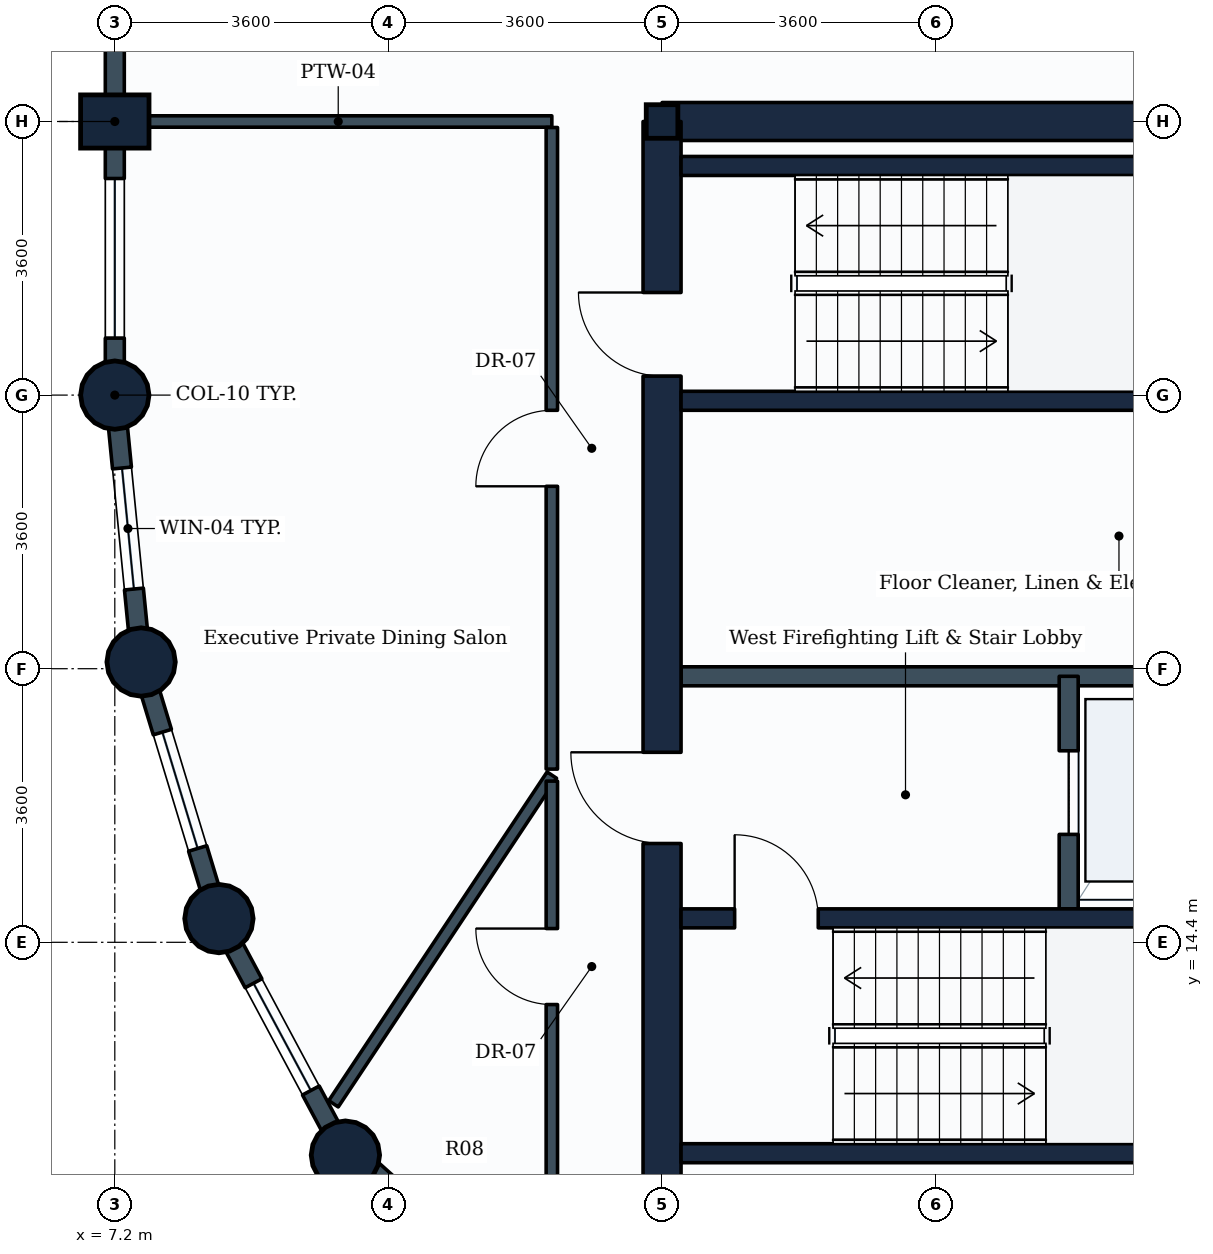
"""IFC4 building model, lengths in metres.
Left out: names, types, materials, properties, quantities, classifications, styles, units other than length and angle.
Written with IfcOpenShell. Run it as: python <this file> out.ifc"""

import sys

from ifc_helpers import new_model, si_unit, direction, frame, frame_2d, origin, origin_2d, place, context, subcontext, project, spatial, rectangle, circle, i_section, extrude, element, fill, save


model = new_model("IFC4")
c1 = context("Model", 3, precision=1e-05, world=origin(), true_north=direction((0.0, 1.0)))
c2 = subcontext(c1, "Body", "Model", "MODEL_VIEW")
j1 = project(units=[si_unit("LENGTHUNIT", "METRE"), si_unit("PLANEANGLEUNIT", "RADIAN")], contexts=[c1])
p1 = place(None, origin())
s1 = spatial("IfcSite", under=j1, at=p1, CompositionType="ELEMENT")
p2 = place(p1, origin())
s2 = spatial("IfcBuilding", under=s1, at=p2, CompositionType="ELEMENT")
p3 = place(p2, frame((0.0, 0.0, 201.4)))
s3 = spatial("IfcBuildingStorey", under=s2, at=p3, CompositionType="ELEMENT", Elevation=201.4)
p4 = place(p3, frame((7.2, 21.6, 0.0), z_axis=(0.0, 0.0, 1.0), x_axis=(1.0, 0.0, 0.0)))
e1 = element("IfcColumn", 1, at=p4, inside=s3, PredefinedType="COLUMN", context=c2, shape_type="SweptSolid", body=[
    extrude(circle(Radius=0.45, at=origin_2d()), origin(), (0.0, 0.0, 1.0), 3.8),
])
p5 = place(p3, frame((7.2, 25.2, 0.0), z_axis=(0.0, 0.0, 1.0), x_axis=(0.0, 1.0, 0.0)))
e2 = element("IfcColumn", 2, at=p5, inside=s3, PredefinedType="COLUMN", context=c2, shape_type="SweptSolid", body=[
    extrude(rectangle(XDim=0.7, YDim=0.9, at=origin_2d()), origin(), (0.0, 0.0, 1.0), 3.8),
])
for number, where, z_axis, x_axis in (
    (3, (7.546, 18.088, 0.0), (0.0, 0.0, 1.0), (1.0, 0.0, 0.0)),
    (4, (8.57, 14.712, 0.0), (0.0, 0.0, 1.0), (1.0, 0.0, 0.0)),
    (5, (10.234, 11.6, 0.0), (0.0, 0.0, 1.0), (1.0, 0.0, 0.0)),
):
    element("IfcColumn", number, at=place(p3, frame(where, z_axis=z_axis, x_axis=x_axis)), inside=s3, PredefinedType="COLUMN", context=c2, shape_type="SweptSolid", body=[
        extrude(circle(Radius=0.45, at=origin_2d()), origin(), (0.0, 0.0, 1.0), 3.8),
    ])
p6 = place(p3, frame((14.4, 25.2, 0.0), z_axis=(0.0, 0.0, 1.0), x_axis=(1.0, 0.0, 0.0)))
e6 = element("IfcColumn", 6, at=p6, inside=s3, PredefinedType="COLUMN", context=c2, shape_type="SweptSolid", body=[
    extrude(i_section(OverallWidth=0.416, OverallDepth=0.442, WebThickness=0.025, FlangeThickness=0.041, FilletRadius=0.015, at=origin_2d()), origin(), (0.0, 0.0, 1.0), 3.8),
])
p7 = place(p3, frame((7.2, 25.2, 0.0), z_axis=(0.0, 0.0, 1.0), x_axis=(0.0, 1.0, 0.0)))
e7 = element("IfcWall", 7, at=p7, inside=s3, PredefinedType="STANDARD", context=c2, shape_type="SweptSolid", body=[
    extrude(rectangle(XDim=3.6, YDim=0.25, at=frame_2d((1.8, 0.0))), origin(), (0.0, 0.0, 1.0), 2.93),
])
p8 = place(p3, frame((7.2, 21.6, 0.0), z_axis=(0.0, 0.0, 1.0), x_axis=(0.0, 1.0, 0.0)))
e8 = element("IfcWall", 8, at=p8, inside=s3, PredefinedType="STANDARD", context=c2, shape_type="SweptSolid", body=[
    extrude(rectangle(XDim=3.6, YDim=0.25, at=frame_2d((1.8, 0.0))), origin(), (0.0, 0.0, 1.0), 2.93),
])
p9 = place(p8, frame((0.75, 0.0, 0.85)))
e9 = element("IfcOpeningElement", 9, at=p9, cuts=e8, PredefinedType="OPENING", context=c2, shape_type="SweptSolid", body=[
    extrude(rectangle(XDim=2.1, YDim=1.35, at=frame_2d((1.05, 0.675))), frame((0.0, 0.135, 0.0), z_axis=(0.0, -1.0, 0.0), x_axis=(1.0, 0.0, 0.0)), (0.0, 0.0, 1.0), 0.27),
])
p10 = place(p3, frame((7.546, 18.088, 0.0), z_axis=(0.0, 0.0, 1.0), x_axis=(-0.09802417461, 0.995184033831, 0.0)))
e10 = element("IfcWall", 10, at=p10, inside=s3, PredefinedType="STANDARD", context=c2, shape_type="SweptSolid", body=[
    extrude(rectangle(XDim=3.529, YDim=0.25, at=frame_2d((1.765, 0.0))), origin(), (0.0, 0.0, 1.0), 2.93),
])
p11 = place(p10, frame((0.965, 0.0, 0.85)))
e11 = element("IfcOpeningElement", 11, at=p11, cuts=e10, PredefinedType="OPENING", context=c2, shape_type="SweptSolid", body=[
    extrude(rectangle(XDim=1.6, YDim=1.35, at=frame_2d((0.8, 0.675))), frame((0.0, 0.135, 0.0), z_axis=(0.0, -1.0, 0.0), x_axis=(1.0, 0.0, 0.0)), (0.0, 0.0, 1.0), 0.27),
])
p12 = place(p3, frame((8.57, 14.712, 0.0), z_axis=(0.0, 0.0, 1.0), x_axis=(-0.290305086481, 0.956934144423, 0.0)))
e12 = element("IfcWall", 12, at=p12, inside=s3, PredefinedType="STANDARD", context=c2, shape_type="SweptSolid", body=[
    extrude(rectangle(XDim=3.528, YDim=0.25, at=frame_2d((1.764, 0.0))), origin(), (0.0, 0.0, 1.0), 2.93),
])
p13 = place(p12, frame((0.964, 0.0, 0.85)))
e13 = element("IfcOpeningElement", 13, at=p13, cuts=e12, PredefinedType="OPENING", context=c2, shape_type="SweptSolid", body=[
    extrude(rectangle(XDim=1.6, YDim=1.35, at=frame_2d((0.8, 0.675))), frame((0.0, 0.135, 0.0), z_axis=(0.0, -1.0, 0.0), x_axis=(1.0, 0.0, 0.0)), (0.0, 0.0, 1.0), 0.27),
])
p14 = place(p3, frame((10.234, 11.6, 0.0), z_axis=(0.0, 0.0, 1.0), x_axis=(-0.47151087309, 0.881860247748, 0.0)))
e14 = element("IfcWall", 14, at=p14, inside=s3, PredefinedType="STANDARD", context=c2, shape_type="SweptSolid", body=[
    extrude(rectangle(XDim=3.529, YDim=0.25, at=frame_2d((1.764, 0.0))), origin(), (0.0, 0.0, 1.0), 2.93),
])
p15 = place(p14, frame((0.964, 0.0, 0.85)))
e15 = element("IfcOpeningElement", 15, at=p15, cuts=e14, PredefinedType="OPENING", context=c2, shape_type="SweptSolid", body=[
    extrude(rectangle(XDim=1.6, YDim=1.35, at=frame_2d((0.8, 0.675))), frame((0.0, 0.135, 0.0), z_axis=(0.0, -1.0, 0.0), x_axis=(1.0, 0.0, 0.0)), (0.0, 0.0, 1.0), 0.27),
])
p16 = place(p3, frame((12.472, 8.872, 0.0), z_axis=(0.0, 0.0, 1.0), x_axis=(-0.634258295121, 0.773121216285, 0.0)))
e16 = element("IfcWall", 16, at=p16, inside=s3, PredefinedType="STANDARD", context=c2, shape_type="SweptSolid", body=[
    extrude(rectangle(XDim=3.529, YDim=0.25, at=frame_2d((1.764, 0.0))), origin(), (0.0, 0.0, 1.0), 2.93),
])
p17 = place(p16, frame((0.964, 0.0, 0.85)))
e17 = element("IfcOpeningElement", 17, at=p17, cuts=e16, PredefinedType="OPENING", context=c2, shape_type="SweptSolid", body=[
    extrude(rectangle(XDim=1.6, YDim=1.35, at=frame_2d((0.8, 0.675))), frame((0.0, 0.135, 0.0), z_axis=(0.0, -1.0, 0.0), x_axis=(1.0, 0.0, 0.0)), (0.0, 0.0, 1.0), 0.27),
])
p18 = place(p3, frame((14.4, 25.2, 0.0), z_axis=(0.0, 0.0, 1.0), x_axis=(1.0, 0.0, 0.0)))
e18 = element("IfcWall", 18, at=p18, inside=s3, PredefinedType="SHEAR", context=c2, shape_type="SweptSolid", body=[
    extrude(rectangle(XDim=10.8, YDim=0.5, at=frame_2d((5.4, 0.0))), origin(), (0.0, 0.0, 1.0), 3.55),
])
p19 = place(p3, frame((14.4, 10.8, 0.0), z_axis=(0.0, 0.0, 1.0), x_axis=(0.0, 1.0, 0.0)))
e19 = element("IfcWall", 19, at=p19, inside=s3, PredefinedType="SHEAR", context=c2, shape_type="SweptSolid", body=[
    extrude(rectangle(XDim=14.4, YDim=0.5, at=frame_2d((7.2, 0.0))), origin(), (0.0, 0.0, 1.0), 3.55),
])
p20 = place(p19, frame((11.05, 0.0, 0.0)))
e20 = element("IfcOpeningElement", 20, at=p20, cuts=e19, PredefinedType="OPENING", context=c2, shape_type="SweptSolid", body=[
    extrude(rectangle(XDim=1.1, YDim=2.1, at=frame_2d((0.55, 1.05))), frame((0.0, 0.26, 0.0), z_axis=(0.0, -1.0, 0.0), x_axis=(1.0, 0.0, 0.0)), (0.0, 0.0, 1.0), 0.52),
])
p21 = place(p19, frame((4.9, 0.0, 0.0)))
e21 = element("IfcOpeningElement", 21, at=p21, cuts=e19, PredefinedType="OPENING", context=c2, shape_type="SweptSolid", body=[
    extrude(rectangle(XDim=1.2, YDim=2.1, at=frame_2d((0.6, 1.05))), frame((0.0, 0.26, 0.0), z_axis=(0.0, -1.0, 0.0), x_axis=(1.0, 0.0, 0.0)), (0.0, 0.0, 1.0), 0.52),
])
p22 = place(p3, frame((14.65, 11.625, 0.0), z_axis=(0.0, 0.0, 1.0), x_axis=(1.0, 0.0, 0.0)))
e22 = element("IfcWall", 22, at=p22, inside=s3, PredefinedType="SHEAR", context=c2, shape_type="SweptSolid", body=[
    extrude(rectangle(XDim=8.7, YDim=0.25, at=frame_2d((4.35, 0.0))), origin(), (0.0, 0.0, 1.0), 3.55),
])
p23 = place(p3, frame((14.65, 14.715, 0.0), z_axis=(0.0, 0.0, 1.0), x_axis=(1.0, 0.0, 0.0)))
e23 = element("IfcWall", 23, at=p23, inside=s3, PredefinedType="SHEAR", context=c2, shape_type="SweptSolid", body=[
    extrude(rectangle(XDim=8.7, YDim=0.25, at=frame_2d((4.35, 0.0))), origin(), (0.0, 0.0, 1.0), 3.55),
])
p24 = place(p23, frame((0.705, 0.0, 0.0)))
e24 = element("IfcOpeningElement", 24, at=p24, cuts=e23, PredefinedType="OPENING", context=c2, shape_type="SweptSolid", body=[
    extrude(rectangle(XDim=1.1, YDim=2.1, at=frame_2d((0.55, 1.05))), frame((0.0, 0.135, 0.0), z_axis=(0.0, -1.0, 0.0), x_axis=(1.0, 0.0, 0.0)), (0.0, 0.0, 1.0), 0.27),
])
for number, where, z_axis, x_axis in (
    (25, (14.65, 21.525, 0.0), (0.0, 0.0, 1.0), (1.0, 0.0, 0.0)),
    (26, (14.65, 24.615, 0.0), (0.0, 0.0, 1.0), (1.0, 0.0, 0.0)),
):
    element("IfcWall", number, at=place(p3, frame(where, z_axis=z_axis, x_axis=x_axis)), inside=s3, PredefinedType="SHEAR", context=c2, shape_type="SweptSolid", body=[
        extrude(rectangle(XDim=8.25, YDim=0.25, at=frame_2d((4.125, 0.0))), origin(), (0.0, 0.0, 1.0), 3.55),
    ])
p25 = place(p3, frame((14.65, 17.9, 0.0), z_axis=(0.0, 0.0, 1.0), x_axis=(1.0, 0.0, 0.0)))
e27 = element("IfcWall", 27, at=p25, inside=s3, PredefinedType="PARTITIONING", context=c2, shape_type="SweptSolid", body=[
    extrude(rectangle(XDim=7.15, YDim=0.25, at=frame_2d((3.575, 0.0))), origin(), (0.0, 0.0, 1.0), 3.535),
])
p26 = place(p3, frame((19.75, 14.84, 0.0), z_axis=(0.0, 0.0, 1.0), x_axis=(0.0, 1.0, 0.0)))
e28 = element("IfcWall", 28, at=p26, inside=s3, PredefinedType="PARTITIONING", context=c2, shape_type="SweptSolid", body=[
    extrude(rectangle(XDim=3.06, YDim=0.25, at=frame_2d((1.53, 0.0))), origin(), (0.0, 0.0, 1.0), 3.535),
])
p27 = place(p26, frame((0.98, 0.0, 0.0)))
e29 = element("IfcOpeningElement", 29, at=p27, cuts=e28, PredefinedType="OPENING", context=c2, shape_type="SweptSolid", body=[
    extrude(rectangle(XDim=1.1, YDim=2.1, at=frame_2d((0.55, 1.05))), frame((0.0, 0.135, 0.0), z_axis=(0.0, -1.0, 0.0), x_axis=(1.0, 0.0, 0.0)), (0.0, 0.0, 1.0), 0.27),
])
p28 = place(p3, frame((7.329, 25.2, 0.0), z_axis=(0.0, 0.0, 1.0), x_axis=(1.0, 0.0, 0.0)))
e30 = element("IfcWall", 30, at=p28, inside=s3, PredefinedType="PARTITIONING", context=c2, shape_type="SweptSolid", body=[
    extrude(rectangle(XDim=5.621, YDim=0.15, at=frame_2d((2.811, 0.0))), origin(), (0.0, 0.0, 1.0), 3.535),
])
p29 = place(p3, frame((12.95, 9.35, 0.0), z_axis=(0.0, 0.0, 1.0), x_axis=(-0.74362269849, 0.668599493187, 0.0)))
e31 = element("IfcWall", 31, at=p29, inside=s3, PredefinedType="PARTITIONING", context=c2, shape_type="SweptSolid", body=[
    extrude(rectangle(XDim=3.472, YDim=0.15, at=frame_2d((1.736, 0.0))), origin(), (0.0, 0.0, 1.0), 2.93),
])
p30 = place(p3, frame((12.95, 16.6, 0.0), z_axis=(0.0, 0.0, 1.0), x_axis=(-0.553277952429, -0.832996703088, 0.0)))
e32 = element("IfcWall", 32, at=p30, inside=s3, PredefinedType="PARTITIONING", context=c2, shape_type="SweptSolid", body=[
    extrude(rectangle(XDim=5.192, YDim=0.15, at=frame_2d((2.596, 0.0))), origin(), (0.0, 0.0, 1.0), 2.93),
])
p31 = place(p3, frame((12.95, 16.679, 0.0), z_axis=(0.0, 0.0, 1.0), x_axis=(0.0, 1.0, 0.0)))
e33 = element("IfcWall", 33, at=p31, inside=s3, PredefinedType="PARTITIONING", context=c2, shape_type="SweptSolid", body=[
    extrude(rectangle(XDim=8.442, YDim=0.15, at=frame_2d((4.221, 0.0))), origin(), (0.0, 0.0, 1.0), 3.22),
])
p32 = place(p31, frame((3.721, 0.0, 0.0)))
e34 = element("IfcOpeningElement", 34, at=p32, cuts=e33, PredefinedType="OPENING", context=c2, shape_type="SweptSolid", body=[
    extrude(rectangle(XDim=1.0, YDim=2.1, at=frame_2d((0.5, 1.05))), frame((0.0, 0.085, 0.0), z_axis=(0.0, -1.0, 0.0), x_axis=(1.0, 0.0, 0.0)), (0.0, 0.0, 1.0), 0.17),
])
p33 = place(p3, frame((12.95, 8.609, 0.0), z_axis=(0.0, 0.0, 1.0), x_axis=(0.0, 1.0, 0.0)))
e35 = element("IfcWall", 35, at=p33, inside=s3, PredefinedType="PARTITIONING", context=c2, shape_type="SweptSolid", body=[
    extrude(rectangle(XDim=7.912, YDim=0.15, at=frame_2d((3.956, 0.0))), origin(), (0.0, 0.0, 1.0), 2.93),
])
p34 = place(p33, frame((4.972, 0.0, 0.0)))
e36 = element("IfcOpeningElement", 36, at=p34, cuts=e35, PredefinedType="OPENING", context=c2, shape_type="SweptSolid", body=[
    extrude(rectangle(XDim=1.0, YDim=2.1, at=frame_2d((0.5, 1.05))), frame((0.0, 0.085, 0.0), z_axis=(0.0, -1.0, 0.0), x_axis=(1.0, 0.0, 0.0)), (0.0, 0.0, 1.0), 0.17),
])
p35 = place(p9, origin())
e37 = element("IfcWindow", 37, at=p35, inside=s3, PartitioningType="SINGLE_PANEL", PredefinedType="WINDOW", context=c2, shape_type="SweptSolid", body=[
    extrude(rectangle(XDim=2.1, YDim=1.35, at=frame_2d((1.05, 0.675))), frame((0.0, 0.03, 0.0), z_axis=(0.0, -1.0, 0.0), x_axis=(1.0, 0.0, 0.0)), (0.0, 0.0, 1.0), 0.06),
])
fill(e9, e37)
p36 = place(p11, origin())
e38 = element("IfcWindow", 38, at=p36, inside=s3, PartitioningType="SINGLE_PANEL", PredefinedType="WINDOW", context=c2, shape_type="SweptSolid", body=[
    extrude(rectangle(XDim=1.6, YDim=1.35, at=frame_2d((0.8, 0.675))), frame((0.0, 0.03, 0.0), z_axis=(0.0, -1.0, 0.0), x_axis=(1.0, 0.0, 0.0)), (0.0, 0.0, 1.0), 0.06),
])
fill(e11, e38)
p37 = place(p13, origin())
e39 = element("IfcWindow", 39, at=p37, inside=s3, PartitioningType="SINGLE_PANEL", PredefinedType="WINDOW", context=c2, shape_type="SweptSolid", body=[
    extrude(rectangle(XDim=1.6, YDim=1.35, at=frame_2d((0.8, 0.675))), frame((0.0, 0.03, 0.0), z_axis=(0.0, -1.0, 0.0), x_axis=(1.0, 0.0, 0.0)), (0.0, 0.0, 1.0), 0.06),
])
fill(e13, e39)
p38 = place(p15, origin())
e40 = element("IfcWindow", 40, at=p38, inside=s3, PartitioningType="SINGLE_PANEL", PredefinedType="WINDOW", context=c2, shape_type="SweptSolid", body=[
    extrude(rectangle(XDim=1.6, YDim=1.35, at=frame_2d((0.8, 0.675))), frame((0.0, 0.03, 0.0), z_axis=(0.0, -1.0, 0.0), x_axis=(1.0, 0.0, 0.0)), (0.0, 0.0, 1.0), 0.06),
])
fill(e15, e40)
p39 = place(p24, origin())
e41 = element("IfcDoor", 41, at=p39, inside=s3, OperationType="SINGLE_SWING_LEFT", PredefinedType="DOOR", context=c2, shape_type="SweptSolid", body=[
    extrude(rectangle(XDim=1.1, YDim=2.1, at=frame_2d((0.55, 1.05))), frame((0.0, 0.025, 0.0), z_axis=(0.0, -1.0, 0.0), x_axis=(1.0, 0.0, 0.0)), (0.0, 0.0, 1.0), 0.05),
])
fill(e24, e41)
p40 = place(p20, origin())
e42 = element("IfcDoor", 42, at=p40, inside=s3, OperationType="SINGLE_SWING_RIGHT", PredefinedType="DOOR", context=c2, shape_type="SweptSolid", body=[
    extrude(rectangle(XDim=1.1, YDim=2.1, at=frame_2d((0.55, 1.05))), frame((0.0, 0.025, 0.0), z_axis=(0.0, -1.0, 0.0), x_axis=(1.0, 0.0, 0.0)), (0.0, 0.0, 1.0), 0.05),
])
fill(e20, e42)
p41 = place(p27, origin())
e43 = element("IfcDoor", 43, at=p41, inside=s3, OperationType="SLIDING_TO_LEFT", PredefinedType="DOOR", context=c2, shape_type="SweptSolid", body=[
    extrude(rectangle(XDim=1.1, YDim=2.1, at=frame_2d((0.55, 1.05))), frame((0.0, 0.025, 0.0), z_axis=(0.0, -1.0, 0.0), x_axis=(1.0, 0.0, 0.0)), (0.0, 0.0, 1.0), 0.05),
])
fill(e29, e43)
p42 = place(p21, origin())
e44 = element("IfcDoor", 44, at=p42, inside=s3, OperationType="SINGLE_SWING_RIGHT", PredefinedType="DOOR", context=c2, shape_type="SweptSolid", body=[
    extrude(rectangle(XDim=1.2, YDim=2.1, at=frame_2d((0.6, 1.05))), frame((0.0, 0.025, 0.0), z_axis=(0.0, -1.0, 0.0), x_axis=(1.0, 0.0, 0.0)), (0.0, 0.0, 1.0), 0.05),
])
fill(e21, e44)
p43 = place(p32, origin())
e45 = element("IfcDoor", 45, at=p43, inside=s3, OperationType="SINGLE_SWING_LEFT", PredefinedType="DOOR", context=c2, shape_type="SweptSolid", body=[
    extrude(rectangle(XDim=1.0, YDim=2.1, at=frame_2d((0.5, 1.05))), frame((0.0, 0.025, 0.0), z_axis=(0.0, -1.0, 0.0), x_axis=(1.0, 0.0, 0.0)), (0.0, 0.0, 1.0), 0.05),
])
fill(e34, e45)
p44 = place(p34, origin())
e46 = element("IfcDoor", 46, at=p44, inside=s3, OperationType="SINGLE_SWING_RIGHT", PredefinedType="DOOR", context=c2, shape_type="SweptSolid", body=[
    extrude(rectangle(XDim=1.0, YDim=2.1, at=frame_2d((0.5, 1.05))), frame((0.0, 0.025, 0.0), z_axis=(0.0, -1.0, 0.0), x_axis=(1.0, 0.0, 0.0)), (0.0, 0.0, 1.0), 0.05),
])
fill(e36, e46)
save(model, sys.argv[1])
